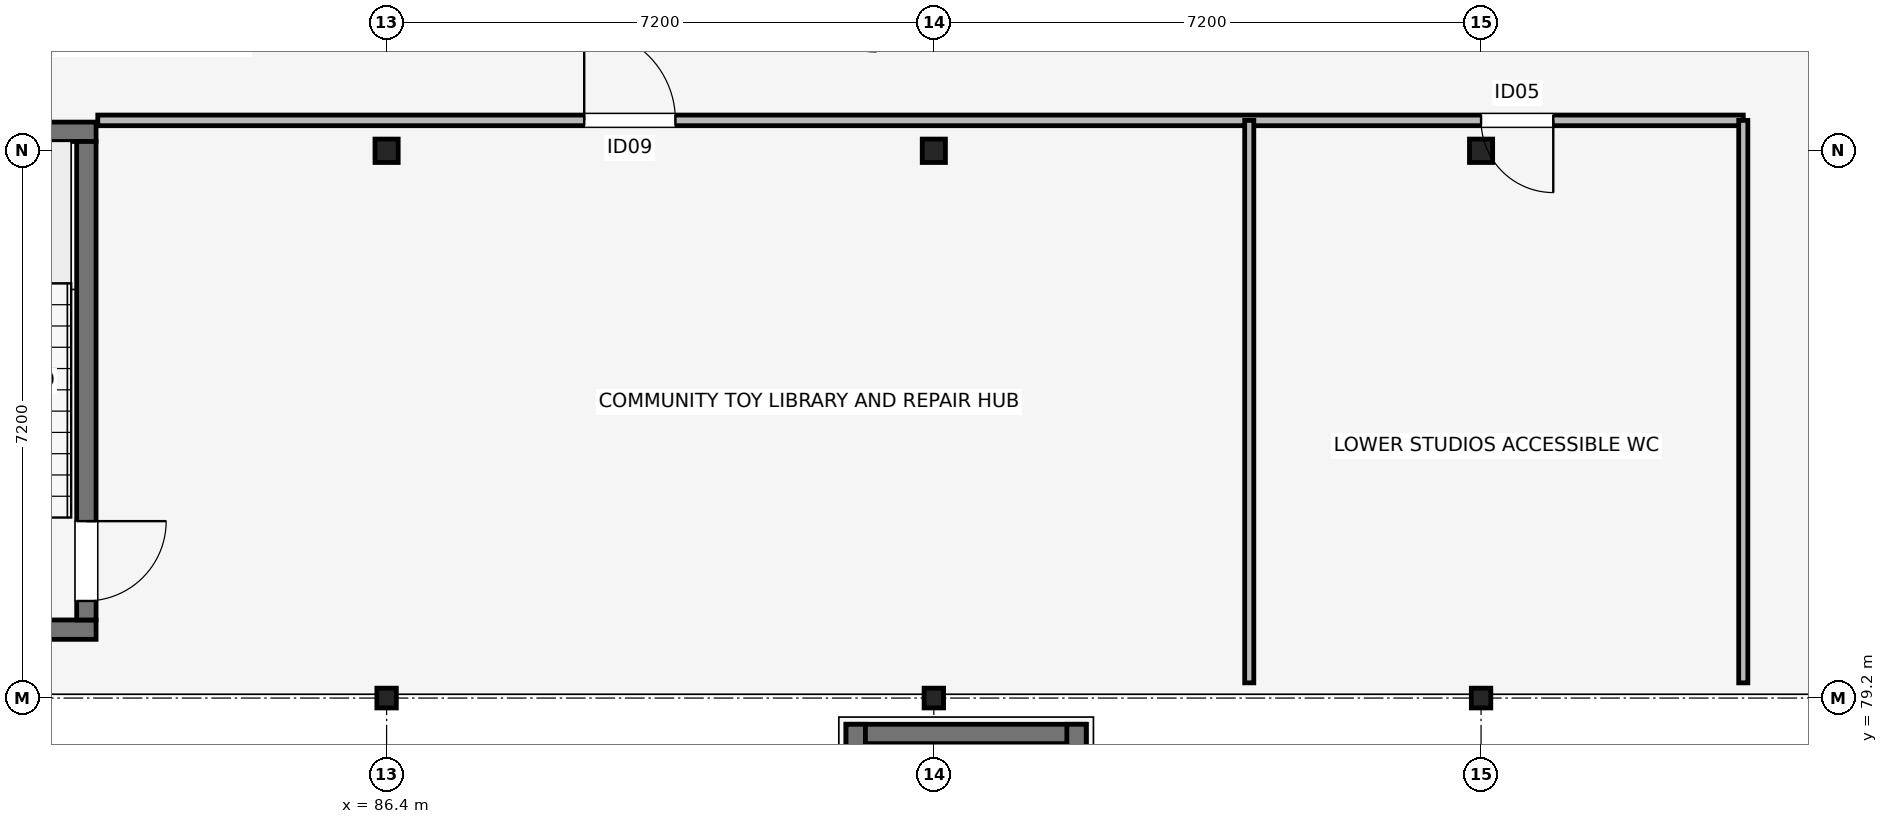
"""IFC4 building model, lengths in metres.
Left out: names, types, materials, properties, quantities, classifications, styles, units other than length and angle.
Written with IfcOpenShell. Run it as: python <this file> out.ifc"""

import sys

from ifc_helpers import new_model, si_unit, direction, frame, frame_2d, origin, origin_2d, place, context, subcontext, project, spatial, rectangle, i_section, extrude, element, fill, save


model = new_model("IFC4")
c1 = context("Model", 3, precision=1e-05, world=origin(), true_north=direction((0.0, 1.0)))
c2 = subcontext(c1, "Body", "Model", "MODEL_VIEW")
j1 = project(units=[si_unit("LENGTHUNIT", "METRE"), si_unit("PLANEANGLEUNIT", "RADIAN")], contexts=[c1])
p1 = place(None, origin())
s1 = spatial("IfcSite", under=j1, at=p1, CompositionType="ELEMENT")
p2 = place(p1, origin())
s2 = spatial("IfcBuilding", under=s1, at=p2, CompositionType="ELEMENT")
p3 = place(p2, origin())
s3 = spatial("IfcBuildingStorey", under=s2, at=p3, CompositionType="ELEMENT", Elevation=0.0)
p4 = place(p3, frame((92.445, 78.728, 0.0), z_axis=(0.0, 0.0, 1.0), x_axis=(1.0, 0.0, 0.0)))
e1 = element("IfcWall", 1, at=p4, inside=s3, PredefinedType="SHEAR", context=c2, shape_type="SweptSolid", body=[
    extrude(rectangle(XDim=3.16, YDim=0.255, at=frame_2d((1.58, 0.0))), origin(), (0.0, 0.0, 1.0), 4.5),
])
for number, where, z_axis, x_axis in (
    (2, (92.573, 72.0, 0.0), (0.0, 0.0, 1.0), (0.0, 1.0, 0.0)),
    (3, (95.478, 72.0, 0.0), (0.0, 0.0, 1.0), (0.0, 1.0, 0.0)),
):
    element("IfcWall", number, at=place(p3, frame(where, z_axis=z_axis, x_axis=x_axis)), inside=s3, PredefinedType="SHEAR", context=c2, shape_type="SweptSolid", body=[
        extrude(rectangle(XDim=6.855, YDim=0.255, at=frame_2d((3.427, 0.0))), origin(), (0.0, 0.0, 1.0), 4.5),
    ])
p5 = place(p3, frame((86.4, 79.2, 0.0), z_axis=(0.0, 0.0, 1.0), x_axis=(1.0, 0.0, 0.0)))
e4 = element("IfcColumn", 4, at=p5, inside=s3, PredefinedType="COLUMN", context=c2, shape_type="SweptSolid", body=[
    extrude(i_section(OverallWidth=0.256, OverallDepth=0.26, WebThickness=0.01, FlangeThickness=0.017, FilletRadius=0.013, at=origin_2d()), origin(), (0.0, 0.0, 1.0), 4.5),
])
p6 = place(p3, frame((86.4, 86.4, 0.0), z_axis=(0.0, 0.0, 1.0), x_axis=(1.0, 0.0, 0.0)))
e5 = element("IfcColumn", 5, at=p6, inside=s3, PredefinedType="COLUMN", context=c2, shape_type="SweptSolid", body=[
    extrude(i_section(OverallWidth=0.305, OverallDepth=0.308, WebThickness=0.01, FlangeThickness=0.015, FilletRadius=0.017, at=origin_2d()), origin(), (0.0, 0.0, 1.0), 4.5),
])
p7 = place(p3, frame((93.6, 79.2, 0.0), z_axis=(0.0, 0.0, 1.0), x_axis=(1.0, 0.0, 0.0)))
e6 = element("IfcColumn", 6, at=p7, inside=s3, PredefinedType="COLUMN", context=c2, shape_type="SweptSolid", body=[
    extrude(i_section(OverallWidth=0.256, OverallDepth=0.26, WebThickness=0.01, FlangeThickness=0.017, FilletRadius=0.013, at=origin_2d()), origin(), (0.0, 0.0, 1.0), 4.5),
])
p8 = place(p3, frame((93.6, 86.4, 0.0), z_axis=(0.0, 0.0, 1.0), x_axis=(1.0, 0.0, 0.0)))
e7 = element("IfcColumn", 7, at=p8, inside=s3, PredefinedType="COLUMN", context=c2, shape_type="SweptSolid", body=[
    extrude(i_section(OverallWidth=0.305, OverallDepth=0.308, WebThickness=0.01, FlangeThickness=0.015, FilletRadius=0.017, at=origin_2d()), origin(), (0.0, 0.0, 1.0), 4.5),
])
p9 = place(p3, frame((100.8, 79.2, 0.0), z_axis=(0.0, 0.0, 1.0), x_axis=(1.0, 0.0, 0.0)))
e8 = element("IfcColumn", 8, at=p9, inside=s3, PredefinedType="COLUMN", context=c2, shape_type="SweptSolid", body=[
    extrude(i_section(OverallWidth=0.256, OverallDepth=0.26, WebThickness=0.01, FlangeThickness=0.017, FilletRadius=0.013, at=origin_2d()), origin(), (0.0, 0.0, 1.0), 4.5),
])
p10 = place(p3, frame((100.8, 86.4, 0.0), z_axis=(0.0, 0.0, 1.0), x_axis=(1.0, 0.0, 0.0)))
e9 = element("IfcColumn", 9, at=p10, inside=s3, PredefinedType="COLUMN", context=c2, shape_type="SweptSolid", body=[
    extrude(i_section(OverallWidth=0.305, OverallDepth=0.308, WebThickness=0.01, FlangeThickness=0.015, FilletRadius=0.017, at=origin_2d()), origin(), (0.0, 0.0, 1.0), 4.5),
])
for number, where, z_axis, x_axis in (
    (10, (79.272, 80.1, 0.0), (0.0, 0.0, 1.0), (1.0, 0.0, 0.0)),
    (11, (79.272, 86.65, 0.0), (0.0, 0.0, 1.0), (1.0, 0.0, 0.0)),
):
    element("IfcWall", number, at=place(p3, frame(where, z_axis=z_axis, x_axis=x_axis)), inside=s3, PredefinedType="SHEAR", context=c2, shape_type="SweptSolid", body=[
        extrude(rectangle(XDim=3.305, YDim=0.255, at=frame_2d((1.652, 0.0))), origin(), (0.0, 0.0, 1.0), 4.5),
    ])
p11 = place(p3, frame((82.45, 80.228, 0.0), z_axis=(0.0, 0.0, 1.0), x_axis=(0.0, 1.0, 0.0)))
e12 = element("IfcWall", 12, at=p11, inside=s3, PredefinedType="SHEAR", context=c2, shape_type="SweptSolid", body=[
    extrude(rectangle(XDim=6.295, YDim=0.255, at=frame_2d((3.147, 0.0))), origin(), (0.0, 0.0, 1.0), 4.5),
])
p12 = place(p11, frame((1.3, 0.0, 0.0), z_axis=(0.0, 0.0, 1.0), x_axis=(-1.0, 0.0, 0.0)))
e13 = element("IfcOpeningElement", 13, at=p12, cuts=e12, PredefinedType="OPENING", context=c2, shape_type="SweptSolid", body=[
    extrude(rectangle(XDim=1.05, YDim=2.12, at=frame_2d((0.525, 1.06))), frame((0.0, 0.137, 0.0), z_axis=(0.0, -1.0, 0.0), x_axis=(1.0, 0.0, 0.0)), (0.0, 0.0, 1.0), 0.275),
])
p13 = place(p3, frame((82.6, 86.8, 0.0), z_axis=(0.0, 0.0, 1.0), x_axis=(1.0, 0.0, 0.0)))
e14 = element("IfcWall", 14, at=p13, inside=s3, PredefinedType="PARTITIONING", context=c2, shape_type="SweptSolid", body=[
    extrude(rectangle(XDim=21.65, YDim=0.14, at=frame_2d((10.825, 0.0))), origin(), (0.0, 0.0, 1.0), 3.5),
])
p14 = place(p13, frame((6.4, 0.0, 0.0)))
e15 = element("IfcOpeningElement", 15, at=p14, cuts=e14, PredefinedType="OPENING", context=c2, shape_type="SweptSolid", body=[
    extrude(rectangle(XDim=1.2, YDim=2.18, at=frame_2d((0.6, 1.09))), frame((0.0, 0.08, 0.0), z_axis=(0.0, -1.0, 0.0), x_axis=(1.0, 0.0, 0.0)), (0.0, 0.0, 1.0), 0.16),
])
p15 = place(p13, frame((19.15, 0.0, 0.0), z_axis=(0.0, 0.0, 1.0), x_axis=(-1.0, 0.0, 0.0)))
e16 = element("IfcOpeningElement", 16, at=p15, cuts=e14, PredefinedType="OPENING", context=c2, shape_type="SweptSolid", body=[
    extrude(rectangle(XDim=0.95, YDim=2.12, at=frame_2d((0.475, 1.06))), frame((0.0, 0.08, 0.0), z_axis=(0.0, -1.0, 0.0), x_axis=(1.0, 0.0, 0.0)), (0.0, 0.0, 1.0), 0.16),
])
for number, where, z_axis, x_axis in (
    (17, (97.75, 79.4, 0.0), (0.0, 0.0, 1.0), (0.0, 1.0, 0.0)),
    (18, (104.25, 79.4, 0.0), (0.0, 0.0, 1.0), (0.0, 1.0, 0.0)),
):
    element("IfcWall", number, at=place(p3, frame(where, z_axis=z_axis, x_axis=x_axis)), inside=s3, PredefinedType="PARTITIONING", context=c2, shape_type="SweptSolid", body=[
        extrude(rectangle(XDim=7.4, YDim=0.12, at=frame_2d((3.7, 0.0))), origin(), (0.0, 0.0, 1.0), 3.5),
    ])
p16 = place(p14, origin())
e19 = element("IfcDoor", 19, at=p16, inside=s3, OperationType="SINGLE_SWING_LEFT", PredefinedType="DOOR", context=c2, shape_type="SweptSolid", body=[
    extrude(rectangle(XDim=1.2, YDim=2.18, at=frame_2d((0.6, 1.09))), frame((0.0, 0.025, 0.0), z_axis=(0.0, -1.0, 0.0), x_axis=(1.0, 0.0, 0.0)), (0.0, 0.0, 1.0), 0.05),
])
fill(e15, e19)
p17 = place(p15, origin())
e20 = element("IfcDoor", 20, at=p17, inside=s3, OperationType="SINGLE_SWING_RIGHT", PredefinedType="DOOR", context=c2, shape_type="SweptSolid", body=[
    extrude(rectangle(XDim=0.95, YDim=2.12, at=frame_2d((0.475, 1.06))), frame((0.0, 0.025, 0.0), z_axis=(0.0, -1.0, 0.0), x_axis=(1.0, 0.0, 0.0)), (0.0, 0.0, 1.0), 0.05),
])
fill(e16, e20)
p18 = place(p12, origin())
e21 = element("IfcDoor", 21, at=p18, inside=s3, OperationType="SINGLE_SWING_RIGHT", PredefinedType="DOOR", context=c2, shape_type="SweptSolid", body=[
    extrude(rectangle(XDim=1.05, YDim=2.12, at=frame_2d((0.525, 1.06))), frame((0.0, 0.025, 0.0), z_axis=(0.0, -1.0, 0.0), x_axis=(1.0, 0.0, 0.0)), (0.0, 0.0, 1.0), 0.05),
])
fill(e13, e21)
save(model, sys.argv[1])
